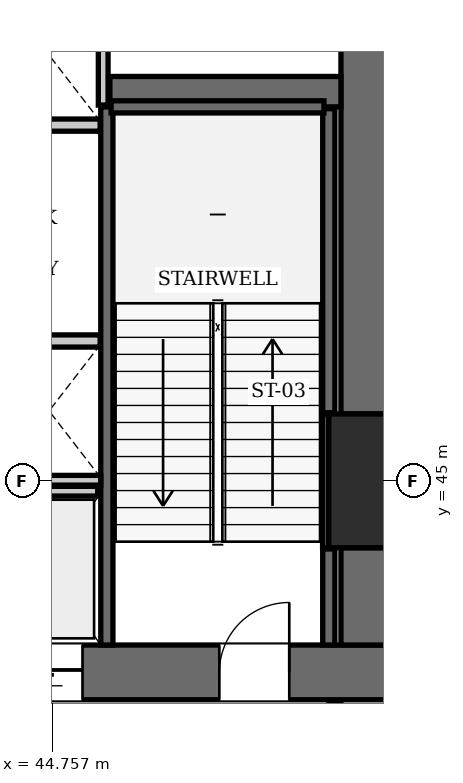
"""IFC4 building model, lengths in metres.
Left out: names, types, materials, properties, quantities, classifications, styles, units other than length and angle.
Written with IfcOpenShell. Run it as: python <this file> out.ifc"""

import sys

from ifc_helpers import new_model, si_unit, direction, frame, frame_2d, origin, origin_2d, place, context, subcontext, project, spatial, rectangle, extrude, element, fill, save


model = new_model("IFC4")
c1 = context("Model", 3, precision=1e-05, world=origin(), true_north=direction((0.0, 1.0)))
c2 = subcontext(c1, "Body", "Model", "MODEL_VIEW")
j1 = project(units=[si_unit("LENGTHUNIT", "METRE"), si_unit("PLANEANGLEUNIT", "RADIAN")], contexts=[c1])
p1 = place(None, origin())
s1 = spatial("IfcSite", under=j1, at=p1, CompositionType="ELEMENT")
p2 = place(p1, origin())
s2 = spatial("IfcBuilding", under=s1, at=p2, CompositionType="ELEMENT")
p3 = place(p2, frame((0.0, 0.0, 5.6)))
s3 = spatial("IfcBuildingStorey", under=s2, at=p3, CompositionType="ELEMENT", Elevation=5.6)
p4 = place(p3, frame((50.4, 45.0, 0.0), z_axis=(0.0, 0.0, 1.0), x_axis=(1.0, 0.0, 0.0)))
e1 = element("IfcColumn", 1, at=p4, inside=s3, PredefinedType="COLUMN", context=c2, shape_type="SweptSolid", body=[
    extrude(rectangle(XDim=2.2, YDim=2.2, at=origin_2d()), origin(), (0.0, 0.0, 1.0), 5.25),
])
p5 = place(p3, frame((43.6, 41.85, 0.0), z_axis=(0.0, 0.0, 1.0), x_axis=(1.0, 0.0, 0.0)))
e2 = element("IfcWall", 2, at=p5, inside=s3, PredefinedType="SHEAR", context=c2, shape_type="SweptSolid", body=[
    extrude(rectangle(XDim=6.8, YDim=0.9, at=frame_2d((3.4, 0.0))), origin(), (0.0, 0.0, 1.0), 5.25),
])
p6 = place(p5, frame((3.9, 0.0, 0.0)))
e3 = element("IfcOpeningElement", 3, at=p6, cuts=e2, PredefinedType="OPENING", context=c2, shape_type="SweptSolid", body=[
    extrude(rectangle(XDim=1.15, YDim=2.15, at=frame_2d((0.575, 1.075))), frame((0.0, 0.46, 0.0), z_axis=(0.0, -1.0, 0.0), x_axis=(1.0, 0.0, 0.0)), (0.0, 0.0, 1.0), 0.92),
])
p7 = place(p5, frame((0.55, 0.0, 0.0)))
e4 = element("IfcOpeningElement", 4, at=p7, cuts=e2, PredefinedType="OPENING", context=c2, shape_type="SweptSolid", body=[
    extrude(rectangle(XDim=1.1, YDim=2.2, at=frame_2d((0.55, 1.1))), frame((0.0, 0.46, 0.0), z_axis=(0.0, -1.0, 0.0), x_axis=(1.0, 0.0, 0.0)), (0.0, 0.0, 1.0), 0.92),
])
p8 = place(p3, frame((49.95, 42.3, 0.0), z_axis=(0.0, 0.0, 1.0), x_axis=(0.0, 1.0, 0.0)))
e5 = element("IfcWall", 5, at=p8, inside=s3, PredefinedType="SHEAR", context=c2, shape_type="SweptSolid", body=[
    extrude(rectangle(XDim=1.6, YDim=0.9, at=frame_2d((0.8, 0.0))), origin(), (0.0, 0.0, 1.0), 5.25),
])
p9 = place(p3, frame((49.95, 46.1, 0.0), z_axis=(0.0, 0.0, 1.0), x_axis=(0.0, 1.0, 0.0)))
e6 = element("IfcWall", 6, at=p9, inside=s3, PredefinedType="SHEAR", context=c2, shape_type="SweptSolid", body=[
    extrude(rectangle(XDim=7.0, YDim=0.9, at=frame_2d((3.5, 0.0))), origin(), (0.0, 0.0, 1.0), 5.25),
])
p10 = place(p3, frame((45.7, 51.4, 0.0), z_axis=(0.0, 0.0, 1.0), x_axis=(1.0, 0.0, 0.0)))
e7 = element("IfcWall", 7, at=p10, inside=s3, PredefinedType="SHEAR", context=c2, shape_type="SweptSolid", body=[
    extrude(rectangle(XDim=3.8, YDim=0.5, at=frame_2d((1.9, 0.0))), origin(), (0.0, 0.0, 1.0), 5.25),
])
p11 = place(p3, frame((45.65, 42.3, 0.0), z_axis=(0.0, 0.0, 1.0), x_axis=(0.0, 1.0, 0.0)))
e8 = element("IfcWall", 8, at=p11, inside=s3, PredefinedType="SOLIDWALL", context=c2, shape_type="SweptSolid", body=[
    extrude(rectangle(XDim=8.85, YDim=0.2, at=frame_2d((4.425, 0.0))), origin(), (0.0, 0.0, 1.0), 4.97),
])
p12 = place(p3, frame((49.3, 42.3, 0.0), z_axis=(0.0, 0.0, 1.0), x_axis=(0.0, 1.0, 0.0)))
e9 = element("IfcWall", 9, at=p12, inside=s3, PredefinedType="SOLIDWALL", context=c2, shape_type="SweptSolid", body=[
    extrude(rectangle(XDim=1.58, YDim=0.2, at=frame_2d((0.79, 0.0))), origin(), (0.0, 0.0, 1.0), 4.97),
])
p13 = place(p3, frame((49.3, 46.12, 0.0), z_axis=(0.0, 0.0, 1.0), x_axis=(0.0, 1.0, 0.0)))
e10 = element("IfcWall", 10, at=p13, inside=s3, PredefinedType="SOLIDWALL", context=c2, shape_type="SweptSolid", body=[
    extrude(rectangle(XDim=5.0, YDim=0.2, at=frame_2d((2.5, 0.0))), origin(), (0.0, 0.0, 1.0), 4.97),
])
p14 = place(p3, frame((45.72, 51.15, 0.0), z_axis=(0.0, 0.0, 1.0), x_axis=(1.0, 0.0, 0.0)))
e11 = element("IfcWall", 11, at=p14, inside=s3, PredefinedType="SOLIDWALL", context=c2, shape_type="SweptSolid", body=[
    extrude(rectangle(XDim=3.5, YDim=0.2, at=frame_2d((1.75, 0.0))), origin(), (0.0, 0.0, 1.0), 4.97),
])
p15 = place(p3, frame((49.248, 43.9, 0.0), z_axis=(0.0, 0.0, 1.0), x_axis=(0.0, 1.0, 0.0)))
e12 = element("IfcWall", 12, at=p15, inside=s3, PredefinedType="SOLIDWALL", context=c2, shape_type="SweptSolid", body=[
    extrude(rectangle(XDim=2.2, YDim=0.1, at=frame_2d((1.1, 0.0))), origin(), (0.0, 0.0, 1.0), 4.97),
])
for number, where, z_axis, x_axis in (
    (13, (43.86, 47.3, 0.0), (0.0, 0.0, 1.0), (1.0, 0.0, 0.0)),
    (14, (43.86, 50.85, 0.0), (0.0, 0.0, 1.0), (1.0, 0.0, 0.0)),
):
    element("IfcWall", number, at=place(p3, frame(where, z_axis=z_axis, x_axis=x_axis)), inside=s3, PredefinedType="SOLIDWALL", context=c2, shape_type="SweptSolid", body=[
        extrude(rectangle(XDim=1.68, YDim=0.2, at=frame_2d((0.84, 0.0))), origin(), (0.0, 0.0, 1.0), 4.97),
    ])
p16 = place(p3, frame((43.9, 44.83, 0.0), z_axis=(0.0, 0.0, 1.0), x_axis=(1.0, 0.0, 0.0)))
e15 = element("IfcWall", 15, at=p16, inside=s3, PredefinedType="SOLIDWALL", context=c2, shape_type="SweptSolid", body=[
    extrude(rectangle(XDim=1.6, YDim=0.16, at=frame_2d((0.8, 0.0))), origin(), (0.0, 0.0, 1.0), 4.97),
])
p17 = place(p3, frame((42.1, 45.01, 0.0), z_axis=(0.0, 0.0, 1.0), x_axis=(1.0, 0.0, 0.0)))
e16 = element("IfcWall", 16, at=p17, inside=s3, PredefinedType="SOLIDWALL", context=c2, shape_type="SweptSolid", body=[
    extrude(rectangle(XDim=3.45, YDim=0.16, at=frame_2d((1.725, 0.0))), origin(), (0.0, 0.0, 1.0), 4.97),
])
p18 = place(p3, frame((45.59, 51.18, 0.0), z_axis=(0.0, 0.0, 1.0), x_axis=(0.0, 1.0, 0.0)))
e17 = element("IfcWall", 17, at=p18, inside=s3, PredefinedType="SOLIDWALL", context=c2, shape_type="SweptSolid", body=[
    extrude(rectangle(XDim=1.92, YDim=0.16, at=frame_2d((0.96, 0.0))), origin(), (0.0, 0.0, 1.0), 4.97),
])
p19 = place(p3, frame((49.4, 38.31, 0.0), z_axis=(0.0, 0.0, 1.0), x_axis=(0.0, 1.0, 0.0)))
e18 = element("IfcWall", 18, at=p19, inside=s3, PredefinedType="PARTITIONING", context=c2, shape_type="SweptSolid", body=[
    extrude(rectangle(XDim=3.07, YDim=0.2, at=frame_2d((1.535, 0.0))), origin(), (0.0, 0.0, 1.0), 4.97),
])
p20 = place(p6, origin())
e19 = element("IfcDoor", 19, at=p20, inside=s3, OperationType="SINGLE_SWING_RIGHT", PredefinedType="DOOR", context=c2, shape_type="SweptSolid", body=[
    extrude(rectangle(XDim=1.15, YDim=2.15, at=frame_2d((0.575, 1.075))), frame((0.0, 0.025, 0.0), z_axis=(0.0, -1.0, 0.0), x_axis=(1.0, 0.0, 0.0)), (0.0, 0.0, 1.0), 0.05),
])
fill(e3, e19)
p21 = place(p7, frame((1.1, 0.0, 0.0), z_axis=(0.0, 0.0, 1.0), x_axis=(-1.0, 0.0, 0.0)))
e20 = element("IfcDoor", 20, at=p21, inside=s3, OperationType="SLIDING_TO_LEFT", PredefinedType="DOOR", context=c2, shape_type="SweptSolid", body=[
    extrude(rectangle(XDim=1.1, YDim=2.2, at=frame_2d((0.55, 1.1))), frame((0.0, 0.025, 0.0), z_axis=(0.0, -1.0, 0.0), x_axis=(1.0, 0.0, 0.0)), (0.0, 0.0, 1.0), 0.05),
])
fill(e4, e20)
save(model, sys.argv[1])
